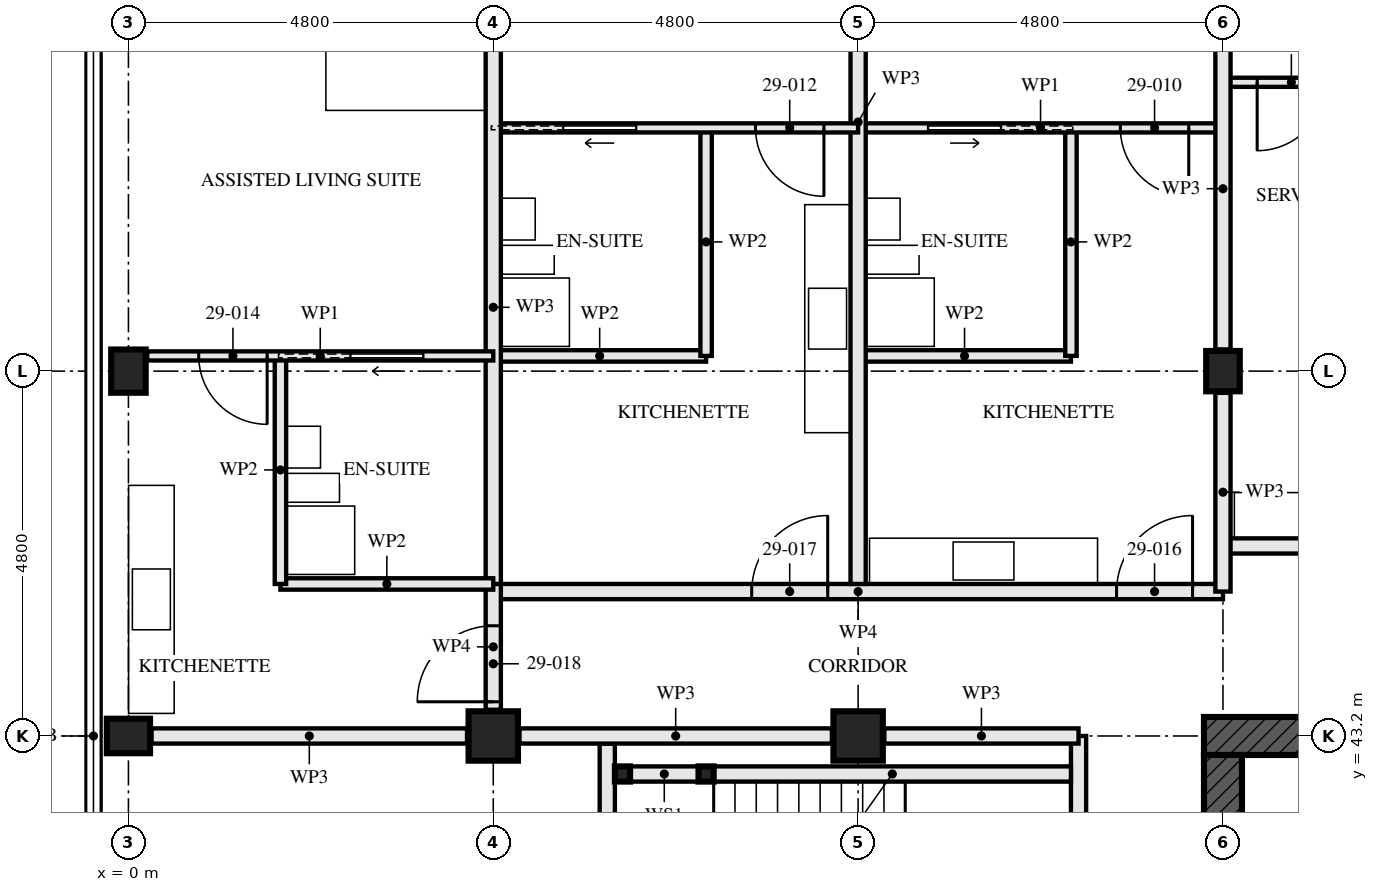
"""IFC4 building model, lengths in metres.
Left out: names, types, materials, properties, quantities, classifications, styles, units other than length and angle.
Written with IfcOpenShell. Run it as: python <this file> out.ifc"""

import sys

from ifc_helpers import new_model, si_unit, direction, frame, frame_2d, origin, origin_2d, place, context, subcontext, project, spatial, rectangle, hollow_rectangle, i_section, extrude, element, fill, save


model = new_model("IFC4")
c1 = context("Model", 3, precision=1e-05, world=origin(), true_north=direction((0.0, 1.0)))
c2 = subcontext(c1, "Body", "Model", "MODEL_VIEW")
j1 = project(units=[si_unit("LENGTHUNIT", "METRE"), si_unit("PLANEANGLEUNIT", "RADIAN")], contexts=[c1])
p1 = place(None, origin())
s1 = spatial("IfcSite", under=j1, at=p1, CompositionType="ELEMENT")
p2 = place(p1, origin())
s2 = spatial("IfcBuilding", under=s1, at=p2, CompositionType="ELEMENT")
p3 = place(p2, frame((0.0, 0.0, 108.5)))
s3 = spatial("IfcBuildingStorey", under=s2, at=p3, CompositionType="ELEMENT", Elevation=108.5)
for number, where, z_axis, x_axis in (
    (1, (0.0, 43.2, 0.0), (0.0, 0.0, 1.0), (0.0, 1.0, 0.0)),
    (2, (0.0, 48.0, 0.0), (0.0, 0.0, 1.0), (1.0, 0.0, 0.0)),
):
    element("IfcColumn", number, at=place(p3, frame(where, z_axis=z_axis, x_axis=x_axis)), inside=s3, PredefinedType="COLUMN", context=c2, shape_type="SweptSolid", body=[
        extrude(i_section(OverallWidth=0.454, OverallDepth=0.569, WebThickness=0.078, FlangeThickness=0.125, FilletRadius=0.015, at=origin_2d()), origin(), (0.0, 0.0, 1.0), 3.5),
    ])
for number, where, z_axis, x_axis in (
    (3, (4.8, 43.2, 0.0), (0.0, 0.0, 1.0), (0.0, 1.0, 0.0)),
    (4, (9.6, 43.2, 0.0), (0.0, 0.0, 1.0), (0.0, 1.0, 0.0)),
):
    element("IfcColumn", number, at=place(p3, frame(where, z_axis=z_axis, x_axis=x_axis)), inside=s3, PredefinedType="COLUMN", context=c2, shape_type="SweptSolid", body=[
        extrude(hollow_rectangle(XDim=0.65, YDim=0.65, WallThickness=0.05, at=origin_2d()), origin(), (0.0, 0.0, 1.0), 3.5),
    ])
p4 = place(p3, frame((14.4, 48.0, 0.0), z_axis=(0.0, 0.0, 1.0), x_axis=(1.0, 0.0, 0.0)))
e5 = element("IfcColumn", 5, at=p4, inside=s3, PredefinedType="COLUMN", context=c2, shape_type="SweptSolid", body=[
    extrude(i_section(OverallWidth=0.442, OverallDepth=0.531, WebThickness=0.066, FlangeThickness=0.106, FilletRadius=0.015, at=origin_2d()), origin(), (0.0, 0.0, 1.0), 3.5),
])
p5 = place(p3, frame((29.05, 43.2, -0.17), z_axis=(0.0, 0.0, 1.0), x_axis=(-1.0, 0.0, 0.0)))
e6 = element("IfcWall", 6, at=p5, inside=s3, PredefinedType="SHEAR", context=c2, shape_type="SweptSolid", body=[
    extrude(rectangle(XDim=14.9, YDim=0.5, at=frame_2d((7.45, 0.0))), origin(), (0.0, 0.0, 1.0), 3.5),
])
p6 = place(p5, frame((6.85, 0.0, 0.17)))
e7 = element("IfcOpeningElement", 7, at=p6, cuts=e6, PredefinedType="OPENING", context=c2, shape_type="SweptSolid", body=[
    extrude(rectangle(XDim=1.2, YDim=2.1, at=frame_2d((0.6, 1.05))), frame((0.0, 0.26, 0.0), z_axis=(0.0, -1.0, 0.0), x_axis=(1.0, 0.0, 0.0)), (0.0, 0.0, 1.0), 0.521),
])
p7 = place(p3, frame((14.4, 42.95, -0.17), z_axis=(0.0, 0.0, 1.0), x_axis=(0.0, -1.0, 0.0)))
e8 = element("IfcWall", 8, at=p7, inside=s3, PredefinedType="SHEAR", context=c2, shape_type="SweptSolid", body=[
    extrude(rectangle(XDim=13.9, YDim=0.5, at=frame_2d((6.95, 0.0))), origin(), (0.0, 0.0, 1.0), 3.5),
])
p8 = place(p7, frame((6.35, 0.0, 0.17)))
e9 = element("IfcOpeningElement", 9, at=p8, cuts=e8, PredefinedType="OPENING", context=c2, shape_type="SweptSolid", body=[
    extrude(rectangle(XDim=1.2, YDim=2.1, at=frame_2d((0.6, 1.05))), frame((0.0, 0.26, 0.0), z_axis=(0.0, -1.0, 0.0), x_axis=(1.0, 0.0, 0.0)), (0.0, 0.0, 1.0), 0.521),
])
for number, where, z_axis, x_axis in (
    (10, (6.5, 42.7, 0.0), (0.0, 0.0, 1.0), (1.0, 0.0, 0.0)),
    (11, (7.6, 42.7, 0.0), (0.0, 0.0, 1.0), (1.0, 0.0, 0.0)),
):
    element("IfcColumn", number, at=place(p3, frame(where, z_axis=z_axis, x_axis=x_axis)), inside=s3, PredefinedType="COLUMN", context=c2, shape_type="SweptSolid", body=[
        extrude(hollow_rectangle(XDim=0.2, YDim=0.2, WallThickness=0.008, at=origin_2d()), origin(), (0.0, 0.0, 1.0), 3.33),
    ])
p9 = place(p3, frame((6.6, 42.7, 0.0), z_axis=(0.0, 0.0, 1.0), x_axis=(1.0, 0.0, 0.0)))
e12 = element("IfcWall", 12, at=p9, inside=s3, PredefinedType="SOLIDWALL", context=c2, shape_type="SweptSolid", body=[
    extrude(rectangle(XDim=0.9, YDim=0.2, at=frame_2d((0.45, 0.0))), origin(), (0.0, 0.0, 1.0), 2.99),
])
p10 = place(p3, frame((7.7, 42.7, 0.0), z_axis=(0.0, 0.0, 1.0), x_axis=(1.0, 0.0, 0.0)))
e13 = element("IfcWall", 13, at=p10, inside=s3, PredefinedType="SOLIDWALL", context=c2, shape_type="SweptSolid", body=[
    extrude(rectangle(XDim=4.7, YDim=0.2, at=frame_2d((2.35, 0.0))), origin(), (0.0, 0.0, 1.0), 2.99),
])
p11 = place(p3, frame((6.3, 43.1, 0.0), z_axis=(0.0, 0.0, 1.0), x_axis=(0.0, -1.0, 0.0)))
e14 = element("IfcWall", 14, at=p11, inside=s3, PredefinedType="SOLIDWALL", context=c2, shape_type="SweptSolid", body=[
    extrude(rectangle(XDim=3.3, YDim=0.2, at=frame_2d((1.65, 0.0))), origin(), (0.0, 0.0, 1.0), 3.33),
])
p12 = place(p3, frame((12.5, 43.2, 0.0), z_axis=(0.0, 0.0, 1.0), x_axis=(0.0, -1.0, 0.0)))
e15 = element("IfcWall", 15, at=p12, inside=s3, PredefinedType="PARTITIONING", context=c2, shape_type="SweptSolid", body=[
    extrude(rectangle(XDim=14.84, YDim=0.2, at=frame_2d((7.42, 0.0))), origin(), (0.0, 0.0, 1.0), 2.32),
])
p13 = place(p12, frame((1.4, 0.0, 0.0)))
e16 = element("IfcOpeningElement", 16, at=p13, cuts=e15, PredefinedType="OPENING", context=c2, shape_type="SweptSolid", body=[
    extrude(rectangle(XDim=1.0, YDim=2.1, at=frame_2d((0.5, 1.05))), frame((0.0, 0.111, 0.0), z_axis=(0.0, -1.0, 0.0), x_axis=(1.0, 0.0, 0.0)), (0.0, 0.0, 1.0), 0.221),
])
p14 = place(p12, frame((5.2, 0.0, 0.0)))
e17 = element("IfcOpeningElement", 17, at=p14, cuts=e15, PredefinedType="OPENING", context=c2, shape_type="SweptSolid", body=[
    extrude(rectangle(XDim=1.0, YDim=2.1, at=frame_2d((0.5, 1.05))), frame((0.0, 0.111, 0.0), z_axis=(0.0, -1.0, 0.0), x_axis=(1.0, 0.0, 0.0)), (0.0, 0.0, 1.0), 0.221),
])
p15 = place(p12, frame((13.0, 0.0, 0.0)))
e18 = element("IfcOpeningElement", 18, at=p15, cuts=e15, PredefinedType="OPENING", context=c2, shape_type="SweptSolid", body=[
    extrude(rectangle(XDim=1.0, YDim=2.1, at=frame_2d((0.5, 1.05))), frame((0.0, 0.111, 0.0), z_axis=(0.0, -1.0, 0.0), x_axis=(1.0, 0.0, 0.0)), (0.0, 0.0, 1.0), 0.221),
])
p16 = place(p3, frame((12.4, 51.2, 0.0), z_axis=(0.0, 0.0, 1.0), x_axis=(0.0, -1.0, 0.0)))
e19 = element("IfcWall", 19, at=p16, inside=s3, PredefinedType="PARTITIONING", context=c2, shape_type="SweptSolid", body=[
    extrude(rectangle(XDim=3.0, YDim=0.15, at=frame_2d((1.5, 0.0))), origin(), (0.0, 0.0, 1.0), 3.33),
])
p17 = place(p3, frame((12.4, 48.2, 0.0), z_axis=(0.0, 0.0, 1.0), x_axis=(-1.0, 0.0, 0.0)))
e20 = element("IfcWall", 20, at=p17, inside=s3, PredefinedType="PARTITIONING", context=c2, shape_type="SweptSolid", body=[
    extrude(rectangle(XDim=2.8, YDim=0.15, at=frame_2d((1.4, 0.0))), origin(), (0.0, 0.0, 1.0), 3.33),
])
p18 = place(p3, frame((14.4, 51.2, 0.0), z_axis=(0.0, 0.0, 1.0), x_axis=(-1.0, 0.0, 0.0)))
e21 = element("IfcWall", 21, at=p18, inside=s3, PredefinedType="PARTITIONING", context=c2, shape_type="SweptSolid", body=[
    extrude(rectangle(XDim=4.8, YDim=0.12, at=frame_2d((2.4, 0.0))), origin(), (0.0, 0.0, 1.0), 3.33),
])
p19 = place(p18, frame((0.45, 0.0, 0.0)))
e22 = element("IfcOpeningElement", 22, at=p19, cuts=e21, PredefinedType="OPENING", context=c2, shape_type="SweptSolid", body=[
    extrude(rectangle(XDim=0.9, YDim=2.1, at=frame_2d((0.45, 1.05))), frame((0.0, 0.071, 0.0), z_axis=(0.0, -1.0, 0.0), x_axis=(1.0, 0.0, 0.0)), (0.0, 0.0, 1.0), 0.141),
])
p20 = place(p18, frame((2.925, 0.0, 0.0)))
e23 = element("IfcOpeningElement", 23, at=p20, cuts=e21, PredefinedType="OPENING", context=c2, shape_type="SweptSolid", body=[
    extrude(rectangle(XDim=0.95, YDim=2.1, at=frame_2d((0.475, 1.05))), frame((0.0, 0.071, 0.0), z_axis=(0.0, -1.0, 0.0), x_axis=(1.0, 0.0, 0.0)), (0.0, 0.0, 1.0), 0.141),
])
p21 = place(p3, frame((9.6, 57.353, 0.0), z_axis=(0.0, 0.0, 1.0), x_axis=(0.0, -1.0, 0.0)))
e24 = element("IfcWall", 24, at=p21, inside=s3, PredefinedType="PARTITIONING", context=c2, shape_type="SweptSolid", body=[
    extrude(rectangle(XDim=12.153, YDim=0.2, at=frame_2d((6.077, 0.0))), origin(), (0.0, 0.0, 1.0), 2.55),
])
p22 = place(p3, frame((7.6, 51.2, 0.0), z_axis=(0.0, 0.0, 1.0), x_axis=(0.0, -1.0, 0.0)))
e25 = element("IfcWall", 25, at=p22, inside=s3, PredefinedType="PARTITIONING", context=c2, shape_type="SweptSolid", body=[
    extrude(rectangle(XDim=3.0, YDim=0.15, at=frame_2d((1.5, 0.0))), origin(), (0.0, 0.0, 1.0), 3.33),
])
p23 = place(p3, frame((7.6, 48.2, 0.0), z_axis=(0.0, 0.0, 1.0), x_axis=(-1.0, 0.0, 0.0)))
e26 = element("IfcWall", 26, at=p23, inside=s3, PredefinedType="PARTITIONING", context=c2, shape_type="SweptSolid", body=[
    extrude(rectangle(XDim=2.8, YDim=0.15, at=frame_2d((1.4, 0.0))), origin(), (0.0, 0.0, 1.0), 3.33),
])
p24 = place(p3, frame((9.6, 51.2, 0.0), z_axis=(0.0, 0.0, 1.0), x_axis=(-1.0, 0.0, 0.0)))
e27 = element("IfcWall", 27, at=p24, inside=s3, PredefinedType="PARTITIONING", context=c2, shape_type="SweptSolid", body=[
    extrude(rectangle(XDim=4.8, YDim=0.12, at=frame_2d((2.4, 0.0))), origin(), (0.0, 0.0, 1.0), 3.33),
])
p25 = place(p24, frame((0.45, 0.0, 0.0)))
e28 = element("IfcOpeningElement", 28, at=p25, cuts=e27, PredefinedType="OPENING", context=c2, shape_type="SweptSolid", body=[
    extrude(rectangle(XDim=0.9, YDim=2.1, at=frame_2d((0.45, 1.05))), frame((0.0, 0.071, 0.0), z_axis=(0.0, -1.0, 0.0), x_axis=(1.0, 0.0, 0.0)), (0.0, 0.0, 1.0), 0.141),
])
p26 = place(p24, frame((2.925, 0.0, 0.0)))
e29 = element("IfcOpeningElement", 29, at=p26, cuts=e27, PredefinedType="OPENING", context=c2, shape_type="SweptSolid", body=[
    extrude(rectangle(XDim=0.95, YDim=2.1, at=frame_2d((0.475, 1.05))), frame((0.0, 0.071, 0.0), z_axis=(0.0, -1.0, 0.0), x_axis=(1.0, 0.0, 0.0)), (0.0, 0.0, 1.0), 0.141),
])
p27 = place(p3, frame((4.8, 52.48, 0.0), z_axis=(0.0, 0.0, 1.0), x_axis=(0.0, -1.0, 0.0)))
e30 = element("IfcWall", 30, at=p27, inside=s3, PredefinedType="PARTITIONING", context=c2, shape_type="SweptSolid", body=[
    extrude(rectangle(XDim=7.28, YDim=0.2, at=frame_2d((3.64, 0.0))), origin(), (0.0, 0.0, 1.0), 2.55),
])
p28 = place(p3, frame((2.0, 48.2, 0.0), z_axis=(0.0, 0.0, 1.0), x_axis=(0.0, -1.0, 0.0)))
e31 = element("IfcWall", 31, at=p28, inside=s3, PredefinedType="PARTITIONING", context=c2, shape_type="SweptSolid", body=[
    extrude(rectangle(XDim=3.0, YDim=0.15, at=frame_2d((1.5, 0.0))), origin(), (0.0, 0.0, 1.0), 2.55),
])
p29 = place(p3, frame((4.8, 45.2, 0.0), z_axis=(0.0, 0.0, 1.0), x_axis=(-1.0, 0.0, 0.0)))
e32 = element("IfcWall", 32, at=p29, inside=s3, PredefinedType="PARTITIONING", context=c2, shape_type="SweptSolid", body=[
    extrude(rectangle(XDim=2.8, YDim=0.15, at=frame_2d((1.4, 0.0))), origin(), (0.0, 0.0, 1.0), 3.33),
])
p30 = place(p3, frame((4.8, 48.2, 0.0), z_axis=(0.0, 0.0, 1.0), x_axis=(-1.0, 0.0, 0.0)))
e33 = element("IfcWall", 33, at=p30, inside=s3, PredefinedType="PARTITIONING", context=c2, shape_type="SweptSolid", body=[
    extrude(rectangle(XDim=4.553, YDim=0.12, at=frame_2d((2.276, 0.0))), origin(), (0.0, 0.0, 1.0), 3.33),
])
p31 = place(p30, frame((2.975, 0.0, 0.0)))
e34 = element("IfcOpeningElement", 34, at=p31, cuts=e33, PredefinedType="OPENING", context=c2, shape_type="SweptSolid", body=[
    extrude(rectangle(XDim=0.9, YDim=2.1, at=frame_2d((0.45, 1.05))), frame((0.0, 0.071, 0.0), z_axis=(0.0, -1.0, 0.0), x_axis=(1.0, 0.0, 0.0)), (0.0, 0.0, 1.0), 0.141),
])
p32 = place(p30, frame((0.925, 0.0, 0.0)))
e35 = element("IfcOpeningElement", 35, at=p32, cuts=e33, PredefinedType="OPENING", context=c2, shape_type="SweptSolid", body=[
    extrude(rectangle(XDim=0.95, YDim=2.1, at=frame_2d((0.475, 1.05))), frame((0.0, 0.071, 0.0), z_axis=(0.0, -1.0, 0.0), x_axis=(1.0, 0.0, 0.0)), (0.0, 0.0, 1.0), 0.141),
])
p33 = place(p3, frame((14.4, 45.1, 0.0), z_axis=(0.0, 0.0, 1.0), x_axis=(-1.0, 0.0, 0.0)))
e36 = element("IfcWall", 36, at=p33, inside=s3, PredefinedType="PARTITIONING", context=c2, shape_type="SweptSolid", body=[
    extrude(rectangle(XDim=9.6, YDim=0.2, at=frame_2d((4.8, 0.0))), origin(), (0.0, 0.0, 1.0), 3.33),
])
p34 = place(p33, frame((0.4, 0.0, 0.0)))
e37 = element("IfcOpeningElement", 37, at=p34, cuts=e36, PredefinedType="OPENING", context=c2, shape_type="SweptSolid", body=[
    extrude(rectangle(XDim=1.0, YDim=2.1, at=frame_2d((0.5, 1.05))), frame((0.0, 0.111, 0.0), z_axis=(0.0, -1.0, 0.0), x_axis=(1.0, 0.0, 0.0)), (0.0, 0.0, 1.0), 0.221),
])
p35 = place(p33, frame((5.2, 0.0, 0.0)))
e38 = element("IfcOpeningElement", 38, at=p35, cuts=e36, PredefinedType="OPENING", context=c2, shape_type="SweptSolid", body=[
    extrude(rectangle(XDim=1.0, YDim=2.1, at=frame_2d((0.5, 1.05))), frame((0.0, 0.111, 0.0), z_axis=(0.0, -1.0, 0.0), x_axis=(1.0, 0.0, 0.0)), (0.0, 0.0, 1.0), 0.221),
])
p36 = place(p3, frame((4.8, 45.2, 0.0), z_axis=(0.0, 0.0, 1.0), x_axis=(0.0, -1.0, 0.0)))
e39 = element("IfcWall", 39, at=p36, inside=s3, PredefinedType="PARTITIONING", context=c2, shape_type="SweptSolid", body=[
    extrude(rectangle(XDim=1.655, YDim=0.2, at=frame_2d((0.828, 0.0))), origin(), (0.0, 0.0, 1.0), 3.33),
])
p37 = place(p36, frame((0.55, 0.0, 0.0)))
e40 = element("IfcOpeningElement", 40, at=p37, cuts=e39, PredefinedType="OPENING", context=c2, shape_type="SweptSolid", body=[
    extrude(rectangle(XDim=1.0, YDim=2.1, at=frame_2d((0.5, 1.05))), frame((0.0, 0.111, 0.0), z_axis=(0.0, -1.0, 0.0), x_axis=(1.0, 0.0, 0.0)), (0.0, 0.0, 1.0), 0.221),
])
p38 = place(p3, frame((19.2, 51.8, 0.0), z_axis=(0.0, 0.0, 1.0), x_axis=(-1.0, 0.0, 0.0)))
e41 = element("IfcWall", 41, at=p38, inside=s3, PredefinedType="PARTITIONING", context=c2, shape_type="SweptSolid", body=[
    extrude(rectangle(XDim=4.8, YDim=0.12, at=frame_2d((2.4, 0.0))), origin(), (0.0, 0.0, 1.0), 3.33),
])
p39 = place(p38, frame((3.45, 0.0, 0.0)))
e42 = element("IfcOpeningElement", 42, at=p39, cuts=e41, PredefinedType="OPENING", context=c2, shape_type="SweptSolid", body=[
    extrude(rectangle(XDim=0.9, YDim=2.1, at=frame_2d((0.45, 1.05))), frame((0.0, 0.071, 0.0), z_axis=(0.0, -1.0, 0.0), x_axis=(1.0, 0.0, 0.0)), (0.0, 0.0, 1.0), 0.141),
])
p40 = place(p3, frame((29.24, 45.7, 0.0), z_axis=(0.0, 0.0, 1.0), x_axis=(-1.0, 0.0, 0.0)))
e43 = element("IfcWall", 43, at=p40, inside=s3, PredefinedType="PARTITIONING", context=c2, shape_type="SweptSolid", body=[
    extrude(rectangle(XDim=14.84, YDim=0.2, at=frame_2d((7.42, 0.0))), origin(), (0.0, 0.0, 1.0), 2.32),
])
p41 = place(p40, frame((0.84, 0.0, 0.0)))
e44 = element("IfcOpeningElement", 44, at=p41, cuts=e43, PredefinedType="OPENING", context=c2, shape_type="SweptSolid", body=[
    extrude(rectangle(XDim=1.0, YDim=2.1, at=frame_2d((0.5, 1.05))), frame((0.0, 0.111, 0.0), z_axis=(0.0, -1.0, 0.0), x_axis=(1.0, 0.0, 0.0)), (0.0, 0.0, 1.0), 0.221),
])
p42 = place(p40, frame((10.44, 0.0, 0.0)))
e45 = element("IfcOpeningElement", 45, at=p42, cuts=e43, PredefinedType="OPENING", context=c2, shape_type="SweptSolid", body=[
    extrude(rectangle(XDim=1.0, YDim=2.1, at=frame_2d((0.5, 1.05))), frame((0.0, 0.111, 0.0), z_axis=(0.0, -1.0, 0.0), x_axis=(1.0, 0.0, 0.0)), (0.0, 0.0, 1.0), 0.221),
])
p43 = place(p3, frame((12.5, 43.2, 0.0), z_axis=(0.0, 0.0, 1.0), x_axis=(-1.0, 0.0, 0.0)))
e46 = element("IfcWall", 46, at=p43, inside=s3, PredefinedType="PARTITIONING", context=c2, shape_type="SweptSolid", body=[
    extrude(rectangle(XDim=2.555, YDim=0.2, at=frame_2d((1.277, 0.0))), origin(), (0.0, 0.0, 1.0), 2.32),
])
p44 = place(p3, frame((9.255, 43.2, 0.0), z_axis=(0.0, 0.0, 1.0), x_axis=(-1.0, 0.0, 0.0)))
e47 = element("IfcWall", 47, at=p44, inside=s3, PredefinedType="PARTITIONING", context=c2, shape_type="SweptSolid", body=[
    extrude(rectangle(XDim=4.11, YDim=0.2, at=frame_2d((2.055, 0.0))), origin(), (0.0, 0.0, 1.0), 2.32),
])
p45 = place(p3, frame((4.455, 43.2, 0.0), z_axis=(0.0, 0.0, 1.0), x_axis=(-1.0, 0.0, 0.0)))
e48 = element("IfcWall", 48, at=p45, inside=s3, PredefinedType="PARTITIONING", context=c2, shape_type="SweptSolid", body=[
    extrude(rectangle(XDim=4.151, YDim=0.2, at=frame_2d((2.075, 0.0))), origin(), (0.0, 0.0, 1.0), 2.32),
])
p46 = place(p3, frame((14.4, 45.1, 0.0), z_axis=(0.0, 0.0, 1.0), x_axis=(0.0, 1.0, 0.0)))
e49 = element("IfcWall", 49, at=p46, inside=s3, PredefinedType="PARTITIONING", context=c2, shape_type="SweptSolid", body=[
    extrude(rectangle(XDim=2.615, YDim=0.2, at=frame_2d((1.307, 0.0))), origin(), (0.0, 0.0, 1.0), 2.32),
])
p47 = place(p3, frame((14.4, 48.285, 0.0), z_axis=(0.0, 0.0, 1.0), x_axis=(0.0, 1.0, 0.0)))
e50 = element("IfcWall", 50, at=p47, inside=s3, PredefinedType="PARTITIONING", context=c2, shape_type="SweptSolid", body=[
    extrude(rectangle(XDim=4.229, YDim=0.2, at=frame_2d((2.115, 0.0))), origin(), (0.0, 0.0, 1.0), 2.32),
])
p48 = place(p19, origin())
e51 = element("IfcDoor", 51, at=p48, inside=s3, OperationType="SINGLE_SWING_RIGHT", PredefinedType="DOOR", context=c2, shape_type="SweptSolid", body=[
    extrude(rectangle(XDim=0.9, YDim=2.1, at=frame_2d((0.45, 1.05))), frame((0.0, 0.022, 0.0), z_axis=(0.0, -1.0, 0.0), x_axis=(1.0, 0.0, 0.0)), (0.0, 0.0, 1.0), 0.044),
])
fill(e22, e51)
p49 = place(p20, origin())
e52 = element("IfcDoor", 52, at=p49, inside=s3, OperationType="SLIDING_TO_RIGHT", PredefinedType="DOOR", context=c2, shape_type="SweptSolid", body=[
    extrude(rectangle(XDim=0.95, YDim=2.1, at=frame_2d((0.475, 1.05))), frame((0.0, 0.022, 0.0), z_axis=(0.0, -1.0, 0.0), x_axis=(1.0, 0.0, 0.0)), (0.0, 0.0, 1.0), 0.044),
])
fill(e23, e52)
p50 = place(p25, origin())
e53 = element("IfcDoor", 53, at=p50, inside=s3, OperationType="SINGLE_SWING_RIGHT", PredefinedType="DOOR", context=c2, shape_type="SweptSolid", body=[
    extrude(rectangle(XDim=0.9, YDim=2.1, at=frame_2d((0.45, 1.05))), frame((0.0, 0.022, 0.0), z_axis=(0.0, -1.0, 0.0), x_axis=(1.0, 0.0, 0.0)), (0.0, 0.0, 1.0), 0.044),
])
fill(e28, e53)
p51 = place(p26, origin())
e54 = element("IfcDoor", 54, at=p51, inside=s3, OperationType="SLIDING_TO_LEFT", PredefinedType="DOOR", context=c2, shape_type="SweptSolid", body=[
    extrude(rectangle(XDim=0.95, YDim=2.1, at=frame_2d((0.475, 1.05))), frame((0.0, 0.022, 0.0), z_axis=(0.0, -1.0, 0.0), x_axis=(1.0, 0.0, 0.0)), (0.0, 0.0, 1.0), 0.044),
])
fill(e29, e54)
p52 = place(p31, origin())
e55 = element("IfcDoor", 55, at=p52, inside=s3, OperationType="SINGLE_SWING_RIGHT", PredefinedType="DOOR", context=c2, shape_type="SweptSolid", body=[
    extrude(rectangle(XDim=0.9, YDim=2.1, at=frame_2d((0.45, 1.05))), frame((0.0, 0.022, 0.0), z_axis=(0.0, -1.0, 0.0), x_axis=(1.0, 0.0, 0.0)), (0.0, 0.0, 1.0), 0.044),
])
fill(e34, e55)
p53 = place(p32, origin())
e56 = element("IfcDoor", 56, at=p53, inside=s3, OperationType="SLIDING_TO_LEFT", PredefinedType="DOOR", context=c2, shape_type="SweptSolid", body=[
    extrude(rectangle(XDim=0.95, YDim=2.1, at=frame_2d((0.475, 1.05))), frame((0.0, 0.022, 0.0), z_axis=(0.0, -1.0, 0.0), x_axis=(1.0, 0.0, 0.0)), (0.0, 0.0, 1.0), 0.044),
])
fill(e35, e56)
p54 = place(p34, frame((1.0, 0.0, 0.0), z_axis=(0.0, 0.0, 1.0), x_axis=(-1.0, 0.0, 0.0)))
e57 = element("IfcDoor", 57, at=p54, inside=s3, OperationType="SINGLE_SWING_LEFT", PredefinedType="DOOR", context=c2, shape_type="SweptSolid", body=[
    extrude(rectangle(XDim=1.0, YDim=2.1, at=frame_2d((0.5, 1.05))), frame((0.0, 0.027, 0.0), z_axis=(0.0, -1.0, 0.0), x_axis=(1.0, 0.0, 0.0)), (0.0, 0.0, 1.0), 0.054),
])
fill(e37, e57)
p55 = place(p35, frame((1.0, 0.0, 0.0), z_axis=(0.0, 0.0, 1.0), x_axis=(-1.0, 0.0, 0.0)))
e58 = element("IfcDoor", 58, at=p55, inside=s3, OperationType="SINGLE_SWING_LEFT", PredefinedType="DOOR", context=c2, shape_type="SweptSolid", body=[
    extrude(rectangle(XDim=1.0, YDim=2.1, at=frame_2d((0.5, 1.05))), frame((0.0, 0.027, 0.0), z_axis=(0.0, -1.0, 0.0), x_axis=(1.0, 0.0, 0.0)), (0.0, 0.0, 1.0), 0.054),
])
fill(e38, e58)
p56 = place(p37, frame((1.0, 0.0, 0.0), z_axis=(0.0, 0.0, 1.0), x_axis=(-1.0, 0.0, 0.0)))
e59 = element("IfcDoor", 59, at=p56, inside=s3, OperationType="SINGLE_SWING_RIGHT", PredefinedType="DOOR", context=c2, shape_type="SweptSolid", body=[
    extrude(rectangle(XDim=1.0, YDim=2.1, at=frame_2d((0.5, 1.05))), frame((0.0, 0.027, 0.0), z_axis=(0.0, -1.0, 0.0), x_axis=(1.0, 0.0, 0.0)), (0.0, 0.0, 1.0), 0.054),
])
fill(e40, e59)
p57 = place(p39, origin())
e60 = element("IfcDoor", 60, at=p57, inside=s3, OperationType="SINGLE_SWING_LEFT", PredefinedType="DOOR", context=c2, shape_type="SweptSolid", body=[
    extrude(rectangle(XDim=0.9, YDim=2.1, at=frame_2d((0.45, 1.05))), frame((0.0, 0.022, 0.0), z_axis=(0.0, -1.0, 0.0), x_axis=(1.0, 0.0, 0.0)), (0.0, 0.0, 1.0), 0.044),
])
fill(e42, e60)
save(model, sys.argv[1])
